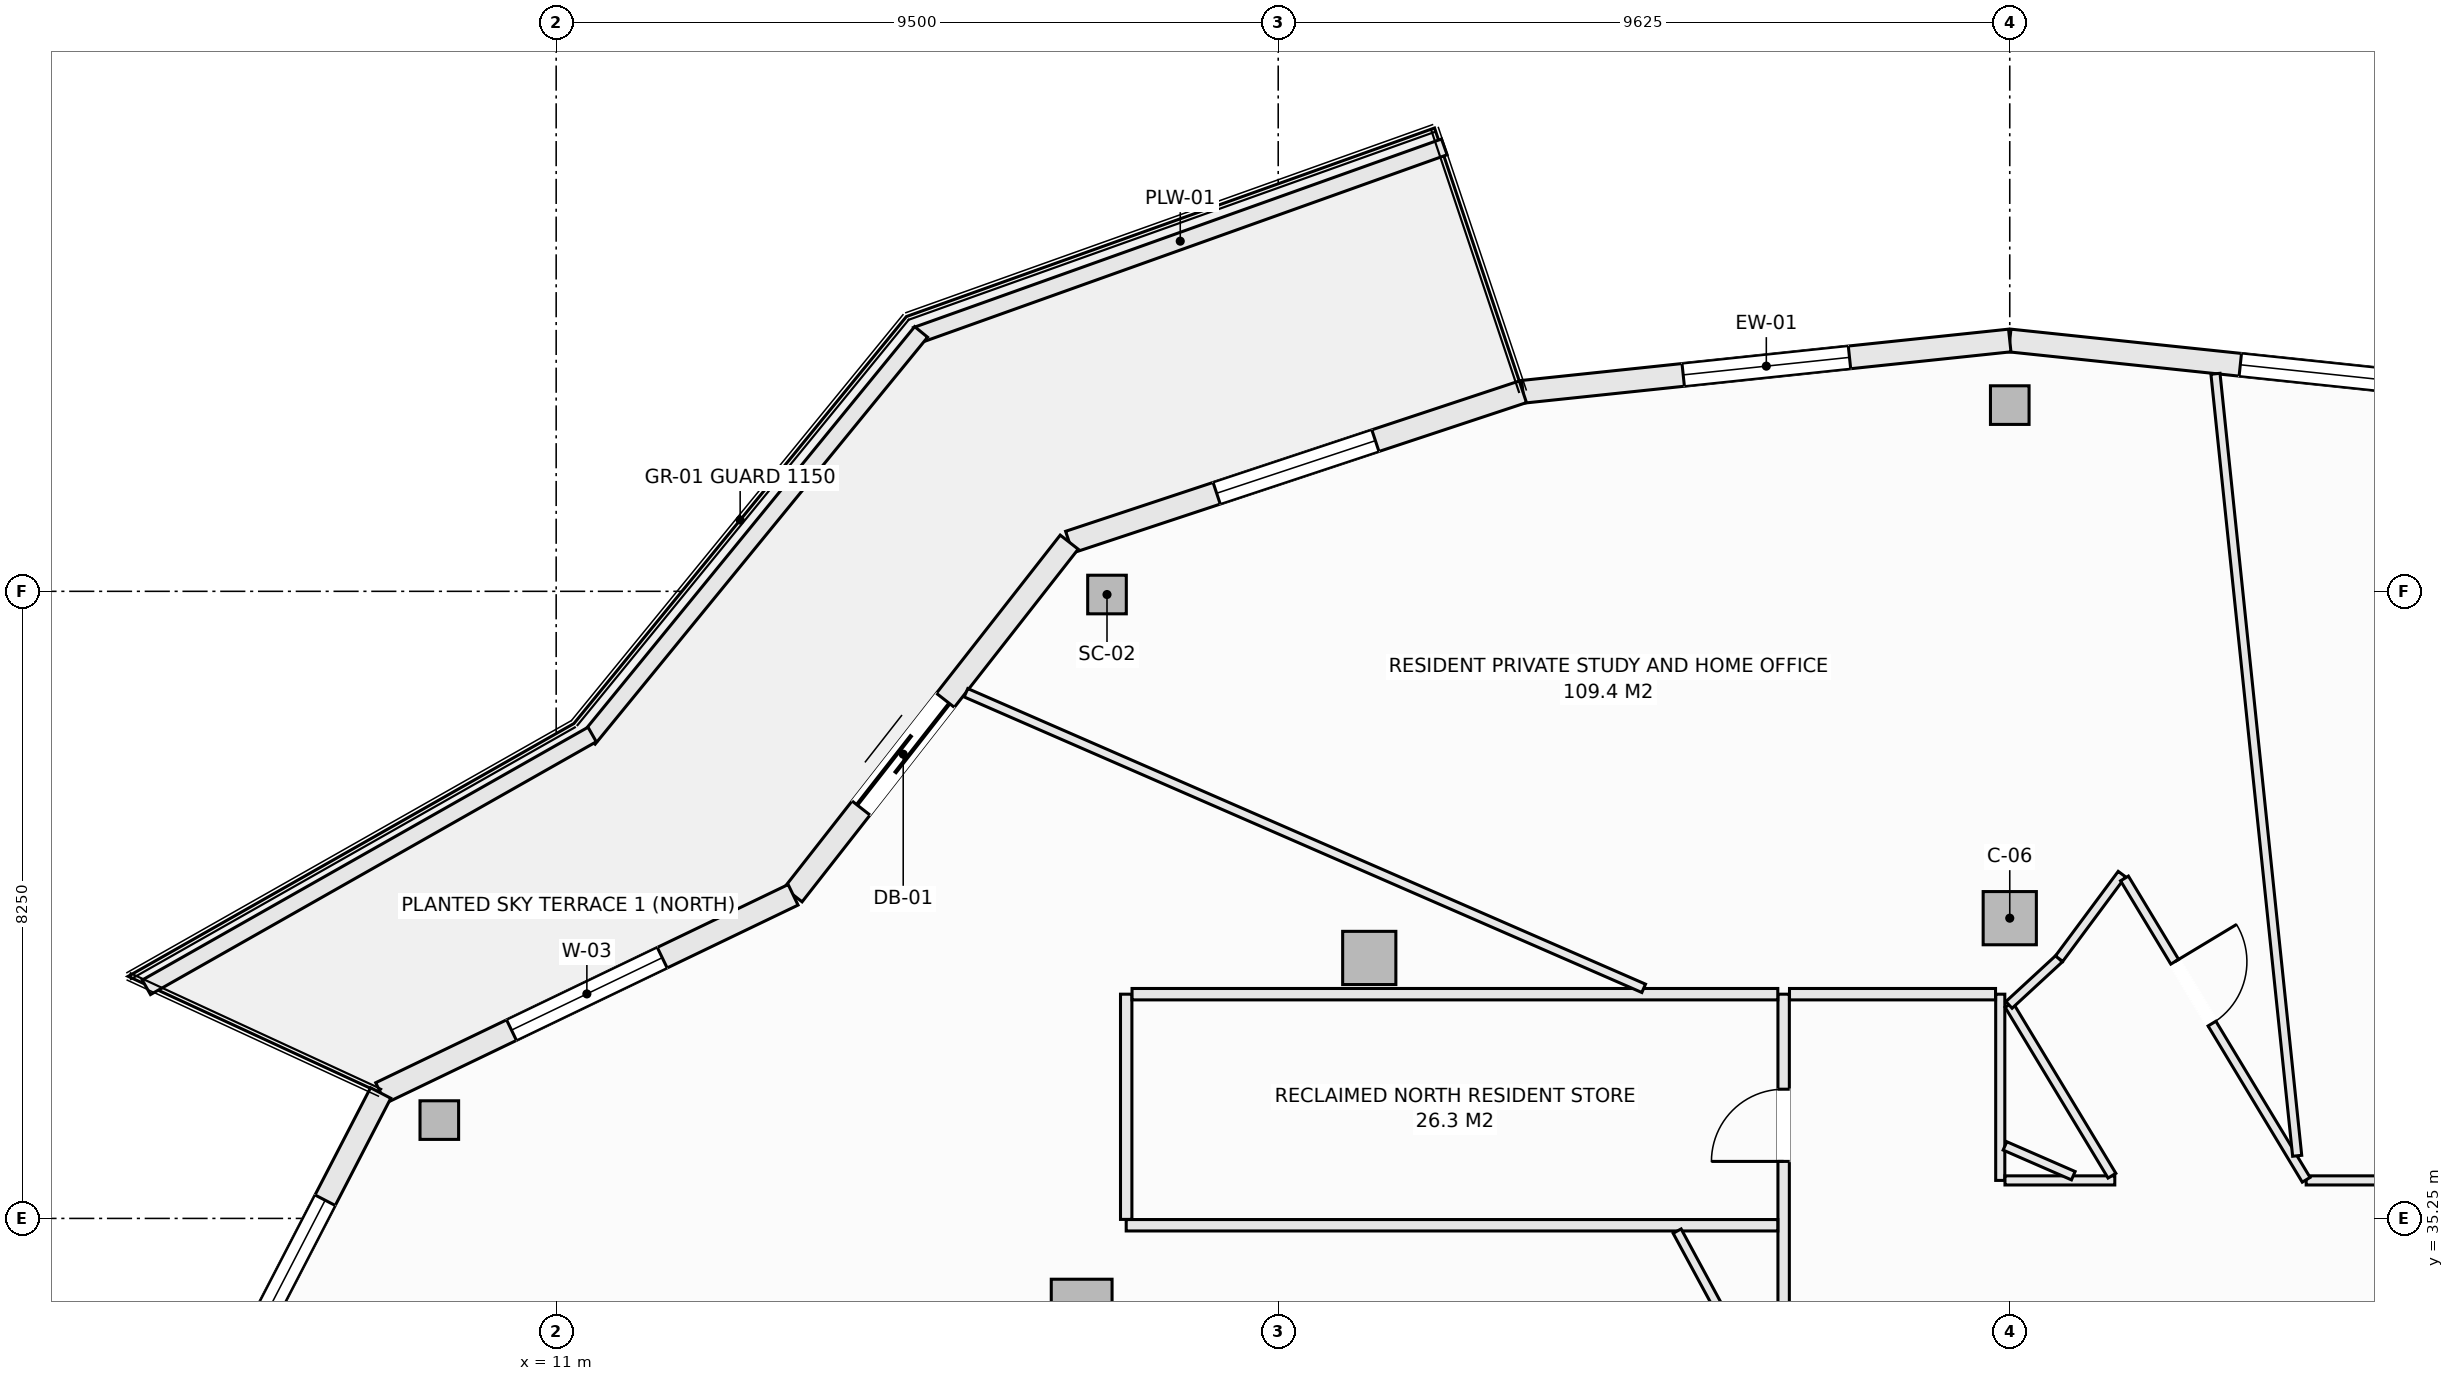
"""IFC4 building model, lengths in metres.
Left out: names, types, materials, properties, quantities, classifications, styles, units other than length and angle.
Written with IfcOpenShell. Run it as: python <this file> out.ifc"""

import sys

from ifc_helpers import new_model, si_unit, direction, frame, frame_2d, origin, origin_2d, place, context, subcontext, project, spatial, rectangle, hollow_rectangle, extrude, element, fill, save


model = new_model("IFC4")
c1 = context("Model", 3, precision=1e-05, world=origin(), true_north=direction((0.0, 1.0)))
c2 = subcontext(c1, "Body", "Model", "MODEL_VIEW")
j1 = project(units=[si_unit("LENGTHUNIT", "METRE"), si_unit("PLANEANGLEUNIT", "RADIAN")], contexts=[c1])
p1 = place(None, origin())
s1 = spatial("IfcSite", under=j1, at=p1, CompositionType="ELEMENT")
p2 = place(p1, origin())
s2 = spatial("IfcBuilding", under=s1, at=p2, CompositionType="ELEMENT")
p3 = place(p2, frame((0.0, 0.0, 229.4)))
s3 = spatial("IfcBuildingStorey", under=s2, at=p3, CompositionType="ELEMENT", Elevation=229.4)
for number, where, z_axis, x_axis in (
    (1, (30.125, 45.95, -0.27), (0.0, 0.0, 1.0), (1.0, 0.0, 0.0)),
    (2, (18.247, 43.458, -0.27), (0.0, 0.0, 1.0), (1.0, 0.0, 0.0)),
    (3, (9.463, 36.544, -0.27), (0.0, 0.0, 1.0), (1.0, 0.0, 0.0)),
):
    element("IfcColumn", number, at=place(p3, frame(where, z_axis=z_axis, x_axis=x_axis)), inside=s3, PredefinedType="COLUMN", context=c2, shape_type="SweptSolid", body=[
        extrude(hollow_rectangle(XDim=0.508, YDim=0.508, WallThickness=0.019, at=origin_2d()), origin(), (0.0, 0.0, 1.0), 3.3),
    ])
for number, where, z_axis, x_axis in (
    (4, (30.125, 39.2, -0.27), (0.0, 0.0, 1.0), (1.0, 0.0, 0.0)),
    (5, (21.698, 38.677, -0.27), (0.0, 0.0, 1.0), (1.0, 0.0, 0.0)),
):
    element("IfcColumn", number, at=place(p3, frame(where, z_axis=z_axis, x_axis=x_axis)), inside=s3, PredefinedType="COLUMN", context=c2, shape_type="SweptSolid", body=[
        extrude(rectangle(XDim=0.7, YDim=0.7, at=origin_2d()), origin(), (0.0, 0.0, 1.0), 3.3),
    ])
p4 = place(p3, frame((17.914, 34.05, -0.27), z_axis=(0.0, 0.0, 1.0), x_axis=(1.0, 0.0, 0.0)))
e6 = element("IfcColumn", 6, at=p4, inside=s3, PredefinedType="PILASTER", context=c2, shape_type="SweptSolid", body=[
    extrude(rectangle(XDim=0.8, YDim=0.8, at=origin_2d()), origin(), (0.0, 0.0, 1.0), 3.3),
])
p5 = place(p3, frame((30.125, 46.8, 0.0), z_axis=(0.0, 0.0, 1.0), x_axis=(0.994497142298, -0.104763705363, 0.0)))
e7 = element("IfcWall", 7, at=p5, inside=s3, PredefinedType="SOLIDWALL", context=c2, shape_type="SweptSolid", body=[
    extrude(rectangle(XDim=6.441, YDim=0.3, at=frame_2d((3.221, 0.0))), origin(), (0.0, 0.0, 1.0), 2.605),
])
p6 = place(p5, frame((3.05, 0.0, 0.72)))
e8 = element("IfcOpeningElement", 8, at=p6, cuts=e7, PredefinedType="OPENING", context=c2, shape_type="SweptSolid", body=[
    extrude(rectangle(XDim=2.2, YDim=1.65, at=frame_2d((1.1, 0.825))), frame((0.0, 0.16, 0.0), z_axis=(0.0, -1.0, 0.0), x_axis=(1.0, 0.0, 0.0)), (0.0, 0.0, 1.0), 0.32),
])
p7 = place(p3, frame((23.719, 46.125, 0.0), z_axis=(0.0, 0.0, 1.0), x_axis=(0.994497142298, 0.104763705363, 0.0)))
e9 = element("IfcWall", 9, at=p7, inside=s3, PredefinedType="SOLIDWALL", context=c2, shape_type="SweptSolid", body=[
    extrude(rectangle(XDim=6.441, YDim=0.3, at=frame_2d((3.221, 0.0))), origin(), (0.0, 0.0, 1.0), 2.605),
])
p8 = place(p7, frame((2.121, 0.0, 0.72)))
e10 = element("IfcOpeningElement", 10, at=p8, cuts=e9, PredefinedType="OPENING", context=c2, shape_type="SweptSolid", body=[
    extrude(rectangle(XDim=2.2, YDim=1.65, at=frame_2d((1.1, 0.825))), frame((0.0, 0.16, 0.0), z_axis=(0.0, -1.0, 0.0), x_axis=(1.0, 0.0, 0.0)), (0.0, 0.0, 1.0), 0.32),
])
p9 = place(p3, frame((17.75, 44.147, 0.0), z_axis=(0.0, 0.0, 1.0), x_axis=(0.949240877604, 0.314550085495, 0.0)))
e11 = element("IfcWall", 11, at=p9, inside=s3, PredefinedType="SOLIDWALL", context=c2, shape_type="SweptSolid", body=[
    extrude(rectangle(XDim=6.288, YDim=0.3, at=frame_2d((3.144, 0.0))), origin(), (0.0, 0.0, 1.0), 2.605),
])
p10 = place(p9, frame((2.044, 0.0, 0.72)))
e12 = element("IfcOpeningElement", 12, at=p10, cuts=e11, PredefinedType="OPENING", context=c2, shape_type="SweptSolid", body=[
    extrude(rectangle(XDim=2.2, YDim=1.65, at=frame_2d((1.1, 0.825))), frame((0.0, 0.16, 0.0), z_axis=(0.0, -1.0, 0.0), x_axis=(1.0, 0.0, 0.0)), (0.0, 0.0, 1.0), 0.32),
])
p11 = place(p3, frame((14.117, 39.507, 0.0), z_axis=(0.0, 0.0, 1.0), x_axis=(0.616450126935, 0.787393955401, 0.0)))
e13 = element("IfcWall", 13, at=p11, inside=s3, PredefinedType="SOLIDWALL", context=c2, shape_type="SweptSolid", body=[
    extrude(rectangle(XDim=5.893, YDim=0.3, at=frame_2d((2.946, 0.0))), origin(), (0.0, 0.0, 1.0), 2.605),
])
p12 = place(p11, frame((1.45, 0.0, 0.0)))
e14 = element("IfcOpeningElement", 14, at=p12, cuts=e13, PredefinedType="OPENING", context=c2, shape_type="SweptSolid", body=[
    extrude(rectangle(XDim=1.8, YDim=2.25, at=frame_2d((0.9, 1.125))), frame((0.0, 0.16, 0.0), z_axis=(0.0, -1.0, 0.0), x_axis=(1.0, 0.0, 0.0)), (0.0, 0.0, 1.0), 0.32),
])
p13 = place(p3, frame((8.691, 36.9, 0.0), z_axis=(0.0, 0.0, 1.0), x_axis=(0.901348331142, 0.433094892545, 0.0)))
e15 = element("IfcWall", 15, at=p13, inside=s3, PredefinedType="SOLIDWALL", context=c2, shape_type="SweptSolid", body=[
    extrude(rectangle(XDim=6.021, YDim=0.3, at=frame_2d((3.01, 0.0))), origin(), (0.0, 0.0, 1.0), 2.605),
])
p14 = place(p13, frame((1.91, 0.0, 0.72)))
e16 = element("IfcOpeningElement", 16, at=p14, cuts=e15, PredefinedType="OPENING", context=c2, shape_type="SweptSolid", body=[
    extrude(rectangle(XDim=2.2, YDim=1.65, at=frame_2d((1.1, 0.825))), frame((0.0, 0.16, 0.0), z_axis=(0.0, -1.0, 0.0), x_axis=(1.0, 0.0, 0.0)), (0.0, 0.0, 1.0), 0.32),
])
p15 = place(p3, frame((6.218, 32.125, 0.0), z_axis=(0.0, 0.0, 1.0), x_axis=(0.459808219482, 0.888018243786, 0.0)))
e17 = element("IfcWall", 17, at=p15, inside=s3, PredefinedType="SOLIDWALL", context=c2, shape_type="SweptSolid", body=[
    extrude(rectangle(XDim=5.378, YDim=0.3, at=frame_2d((2.689, 0.0))), origin(), (0.0, 0.0, 1.0), 2.605),
])
p16 = place(p15, frame((1.589, 0.0, 0.72)))
e18 = element("IfcOpeningElement", 18, at=p16, cuts=e17, PredefinedType="OPENING", context=c2, shape_type="SweptSolid", body=[
    extrude(rectangle(XDim=2.2, YDim=1.65, at=frame_2d((1.1, 0.825))), frame((0.0, 0.16, 0.0), z_axis=(0.0, -1.0, 0.0), x_axis=(1.0, 0.0, 0.0)), (0.0, 0.0, 1.0), 0.32),
])
p17 = place(p3, frame((15.737, 46.866, 0.0), z_axis=(0.0, 0.0, 1.0), x_axis=(0.941780086523, 0.336229488042, 0.0)))
e19 = element("IfcWall", 19, at=p17, inside=s3, PredefinedType="PARAPET", context=c2, shape_type="SweptSolid", body=[
    extrude(rectangle(XDim=7.378, YDim=0.22, at=frame_2d((3.689, 0.0))), origin(), (0.0, 0.0, 1.0), 0.52),
])
p18 = place(p3, frame((11.427, 41.559, 0.0), z_axis=(0.0, 0.0, 1.0), x_axis=(0.632697312147, 0.774399193699, 0.0)))
e20 = element("IfcWall", 20, at=p18, inside=s3, PredefinedType="PARAPET", context=c2, shape_type="SweptSolid", body=[
    extrude(rectangle(XDim=6.914, YDim=0.22, at=frame_2d((3.457, 0.0))), origin(), (0.0, 0.0, 1.0), 0.52),
])
p19 = place(p3, frame((5.608, 38.291, 0.0), z_axis=(0.0, 0.0, 1.0), x_axis=(0.869860619267, 0.493297580623, 0.0)))
e21 = element("IfcWall", 21, at=p19, inside=s3, PredefinedType="PARAPET", context=c2, shape_type="SweptSolid", body=[
    extrude(rectangle(XDim=6.743, YDim=0.22, at=frame_2d((3.371, 0.0))), origin(), (0.0, 0.0, 1.0), 0.52),
])
p20 = place(p3, frame((27.15, 34.002, 0.0), z_axis=(0.0, 0.0, 1.0), x_axis=(0.0, 1.0, 0.0)))
e22 = element("IfcWall", 22, at=p20, inside=s3, PredefinedType="PARTITIONING", context=c2, shape_type="SweptSolid", body=[
    extrude(rectangle(XDim=4.198, YDim=0.15, at=frame_2d((2.099, 0.0))), origin(), (0.0, 0.0, 1.0), 3.03),
])
p21 = place(p20, frame((1.998, 0.0, 0.0)))
e23 = element("IfcOpeningElement", 23, at=p21, cuts=e22, PredefinedType="OPENING", context=c2, shape_type="SweptSolid", body=[
    extrude(rectangle(XDim=0.95, YDim=2.1, at=frame_2d((0.475, 1.05))), frame((0.0, 0.085, 0.0), z_axis=(0.0, -1.0, 0.0), x_axis=(1.0, 0.0, 0.0)), (0.0, 0.0, 1.0), 0.17),
])
p22 = place(p3, frame((30.0, 35.75, 0.0), z_axis=(0.0, 0.0, 1.0), x_axis=(0.0, 1.0, 0.0)))
e24 = element("IfcWall", 24, at=p22, inside=s3, PredefinedType="PARTITIONING", context=c2, shape_type="SweptSolid", body=[
    extrude(rectangle(XDim=2.45, YDim=0.12, at=frame_2d((1.225, 0.0))), origin(), (0.0, 0.0, 1.0), 3.03),
])
p23 = place(p3, frame((18.5, 35.16, 0.0), z_axis=(0.0, 0.0, 1.0), x_axis=(1.0, 0.0, 0.0)))
e25 = element("IfcWall", 25, at=p23, inside=s3, PredefinedType="PARTITIONING", context=c2, shape_type="SweptSolid", body=[
    extrude(rectangle(XDim=8.573, YDim=0.15, at=frame_2d((4.287, 0.0))), origin(), (0.0, 0.0, 1.0), 3.03),
])
p24 = place(p3, frame((18.5, 35.237, 0.0), z_axis=(0.0, 0.0, 1.0), x_axis=(0.0, 1.0, 0.0)))
e26 = element("IfcWall", 26, at=p24, inside=s3, PredefinedType="PARTITIONING", context=c2, shape_type="SweptSolid", body=[
    extrude(rectangle(XDim=2.963, YDim=0.15, at=frame_2d((1.481, 0.0))), origin(), (0.0, 0.0, 1.0), 3.03),
])
p25 = place(p3, frame((18.577, 38.2, 0.0), z_axis=(0.0, 0.0, 1.0), x_axis=(1.0, 0.0, 0.0)))
e27 = element("IfcWall", 27, at=p25, inside=s3, PredefinedType="PARTITIONING", context=c2, shape_type="SweptSolid", body=[
    extrude(rectangle(XDim=8.496, YDim=0.15, at=frame_2d((4.248, 0.0))), origin(), (0.0, 0.0, 1.0), 3.03),
])
p26 = place(p3, frame((27.227, 38.2, 0.0), z_axis=(0.0, 0.0, 1.0), x_axis=(1.0, 0.0, 0.0)))
e28 = element("IfcWall", 28, at=p26, inside=s3, PredefinedType="PARTITIONING", context=c2, shape_type="SweptSolid", body=[
    extrude(rectangle(XDim=2.711, YDim=0.15, at=frame_2d((1.355, 0.0))), origin(), (0.0, 0.0, 1.0), 3.03),
])
p27 = place(p3, frame((30.062, 35.75, 0.0), z_axis=(0.0, 0.0, 1.0), x_axis=(1.0, 0.0, 0.0)))
e29 = element("IfcWall", 29, at=p27, inside=s3, PredefinedType="PARTITIONING", context=c2, shape_type="SweptSolid", body=[
    extrude(rectangle(XDim=1.445, YDim=0.12, at=frame_2d((0.723, 0.0))), origin(), (0.0, 0.0, 1.0), 3.03),
])
p28 = place(p3, frame((34.025, 35.75, 0.0), z_axis=(0.0, 0.0, 1.0), x_axis=(1.0, 0.0, 0.0)))
e30 = element("IfcWall", 30, at=p28, inside=s3, PredefinedType="PARTITIONING", context=c2, shape_type="SweptSolid", body=[
    extrude(rectangle(XDim=5.025, YDim=0.12, at=frame_2d((2.513, 0.0))), origin(), (0.0, 0.0, 1.0), 2.478),
])
p29 = place(p28, frame((1.617, 0.0, 0.0)))
e31 = element("IfcOpeningElement", 31, at=p29, cuts=e30, PredefinedType="OPENING", context=c2, shape_type="SweptSolid", body=[
    extrude(rectangle(XDim=0.95, YDim=2.1, at=frame_2d((0.475, 1.05))), frame((0.0, 0.07, 0.0), z_axis=(0.0, -1.0, 0.0), x_axis=(1.0, 0.0, 0.0)), (0.0, 0.0, 1.0), 0.14),
])
p30 = place(p3, frame((30.115, 38.059, 0.0), z_axis=(0.0, 0.0, 1.0), x_axis=(0.516246227887, -0.85644020935, 0.0)))
e32 = element("IfcWall", 32, at=p30, inside=s3, PredefinedType="PARTITIONING", context=c2, shape_type="SweptSolid", body=[
    extrude(rectangle(XDim=2.624, YDim=0.12, at=frame_2d((1.312, 0.0))), origin(), (0.0, 0.0, 1.0), 3.03),
])
p31 = place(p3, frame((30.115, 38.059, 0.0), z_axis=(0.0, 0.0, 1.0), x_axis=(0.734991343239, 0.678076489316, 0.0)))
e33 = element("IfcWall", 33, at=p31, inside=s3, PredefinedType="PARTITIONING", context=c2, shape_type="SweptSolid", body=[
    extrude(rectangle(XDim=0.896, YDim=0.12, at=frame_2d((0.448, 0.0))), origin(), (0.0, 0.0, 1.0), 3.03),
])
p32 = place(p3, frame((30.774, 38.667, 0.0), z_axis=(0.0, 0.0, 1.0), x_axis=(0.596019138224, 0.802970227885, 0.0)))
e34 = element("IfcWall", 34, at=p32, inside=s3, PredefinedType="PARTITIONING", context=c2, shape_type="SweptSolid", body=[
    extrude(rectangle(XDim=1.386, YDim=0.12, at=frame_2d((0.693, 0.0))), origin(), (0.0, 0.0, 1.0), 3.03),
])
p33 = place(p3, frame((31.635, 39.723, 0.0), z_axis=(0.0, 0.0, 1.0), x_axis=(0.516340331217, -0.856383478565, 0.0)))
e35 = element("IfcWall", 35, at=p33, inside=s3, PredefinedType="PARTITIONING", context=c2, shape_type="SweptSolid", body=[
    extrude(rectangle(XDim=4.629, YDim=0.12, at=frame_2d((2.315, 0.0))), origin(), (0.0, 0.0, 1.0), 3.03),
])
p34 = place(p33, frame((1.28, 0.0, 0.0)))
e36 = element("IfcOpeningElement", 36, at=p34, cuts=e35, PredefinedType="OPENING", context=c2, shape_type="SweptSolid", body=[
    extrude(rectangle(XDim=0.95, YDim=2.1, at=frame_2d((0.475, 1.05))), frame((0.0, 0.07, 0.0), z_axis=(0.0, -1.0, 0.0), x_axis=(1.0, 0.0, 0.0)), (0.0, 0.0, 1.0), 0.14),
])
p35 = place(p3, frame((16.392, 42.166, 0.0), z_axis=(0.0, 0.0, 1.0), x_axis=(0.916624998673, -0.399748185496, 0.0)))
e37 = element("IfcWall", 37, at=p35, inside=s3, PredefinedType="PARTITIONING", context=c2, shape_type="SweptSolid", body=[
    extrude(rectangle(XDim=9.728, YDim=0.12, at=frame_2d((4.864, 0.0))), origin(), (0.0, 0.0, 1.0), 2.478),
])
p36 = place(p3, frame((30.062, 36.204, 0.0), z_axis=(0.0, 0.0, 1.0), x_axis=(0.916602414635, -0.39979996684, 0.0)))
e38 = element("IfcWall", 38, at=p36, inside=s3, PredefinedType="PARTITIONING", context=c2, shape_type="SweptSolid", body=[
    extrude(rectangle(XDim=0.981, YDim=0.12, at=frame_2d((0.49, 0.0))), origin(), (0.0, 0.0, 1.0), 3.03),
])
p37 = place(p3, frame((32.832, 46.362, 0.0), z_axis=(0.0, 0.0, 1.0), x_axis=(0.103942686354, -0.994583288595, 0.0)))
e39 = element("IfcWall", 39, at=p37, inside=s3, PredefinedType="PARTITIONING", context=c2, shape_type="SweptSolid", body=[
    extrude(rectangle(XDim=10.344, YDim=0.12, at=frame_2d((5.172, 0.0))), origin(), (0.0, 0.0, 1.0), 2.77),
])
p38 = place(p3, frame((25.749, 35.083, 0.0), z_axis=(0.0, 0.0, 1.0), x_axis=(0.476052805352, -0.879416696746, 0.0)))
e40 = element("IfcWall", 40, at=p38, inside=s3, PredefinedType="PARTITIONING", context=c2, shape_type="SweptSolid", body=[
    extrude(rectangle(XDim=1.229, YDim=0.12, at=frame_2d((0.615, 0.0))), origin(), (0.0, 0.0, 1.0), 3.03),
])
p39 = place(p6, origin())
e41 = element("IfcWindow", 41, at=p39, inside=s3, PartitioningType="SINGLE_PANEL", PredefinedType="WINDOW", context=c2, shape_type="SweptSolid", body=[
    extrude(rectangle(XDim=2.2, YDim=1.65, at=frame_2d((1.1, 0.825))), frame((0.0, 0.03, 0.0), z_axis=(0.0, -1.0, 0.0), x_axis=(1.0, 0.0, 0.0)), (0.0, 0.0, 1.0), 0.06),
])
fill(e8, e41)
p40 = place(p8, origin())
e42 = element("IfcWindow", 42, at=p40, inside=s3, PartitioningType="SINGLE_PANEL", PredefinedType="WINDOW", context=c2, shape_type="SweptSolid", body=[
    extrude(rectangle(XDim=2.2, YDim=1.65, at=frame_2d((1.1, 0.825))), frame((0.0, 0.03, 0.0), z_axis=(0.0, -1.0, 0.0), x_axis=(1.0, 0.0, 0.0)), (0.0, 0.0, 1.0), 0.06),
])
fill(e10, e42)
p41 = place(p10, origin())
e43 = element("IfcWindow", 43, at=p41, inside=s3, PartitioningType="SINGLE_PANEL", PredefinedType="WINDOW", context=c2, shape_type="SweptSolid", body=[
    extrude(rectangle(XDim=2.2, YDim=1.65, at=frame_2d((1.1, 0.825))), frame((0.0, 0.03, 0.0), z_axis=(0.0, -1.0, 0.0), x_axis=(1.0, 0.0, 0.0)), (0.0, 0.0, 1.0), 0.06),
])
fill(e12, e43)
p42 = place(p12, origin())
e44 = element("IfcDoor", 44, at=p42, inside=s3, OperationType="SLIDING_TO_LEFT", PredefinedType="DOOR", context=c2, shape_type="SweptSolid", body=[
    extrude(rectangle(XDim=1.8, YDim=2.25, at=frame_2d((0.9, 1.125))), frame((0.0, 0.025, 0.0), z_axis=(0.0, -1.0, 0.0), x_axis=(1.0, 0.0, 0.0)), (0.0, 0.0, 1.0), 0.05),
])
fill(e14, e44)
p43 = place(p14, origin())
e45 = element("IfcWindow", 45, at=p43, inside=s3, PartitioningType="SINGLE_PANEL", PredefinedType="WINDOW", context=c2, shape_type="SweptSolid", body=[
    extrude(rectangle(XDim=2.2, YDim=1.65, at=frame_2d((1.1, 0.825))), frame((0.0, 0.03, 0.0), z_axis=(0.0, -1.0, 0.0), x_axis=(1.0, 0.0, 0.0)), (0.0, 0.0, 1.0), 0.06),
])
fill(e16, e45)
p44 = place(p16, origin())
e46 = element("IfcWindow", 46, at=p44, inside=s3, PartitioningType="SINGLE_PANEL", PredefinedType="WINDOW", context=c2, shape_type="SweptSolid", body=[
    extrude(rectangle(XDim=2.2, YDim=1.65, at=frame_2d((1.1, 0.825))), frame((0.0, 0.03, 0.0), z_axis=(0.0, -1.0, 0.0), x_axis=(1.0, 0.0, 0.0)), (0.0, 0.0, 1.0), 0.06),
])
fill(e18, e46)
p45 = place(p21, origin())
e47 = element("IfcDoor", 47, at=p45, inside=s3, OperationType="SINGLE_SWING_LEFT", PredefinedType="DOOR", context=c2, shape_type="SweptSolid", body=[
    extrude(rectangle(XDim=0.95, YDim=2.1, at=frame_2d((0.475, 1.05))), frame((0.0, 0.025, 0.0), z_axis=(0.0, -1.0, 0.0), x_axis=(1.0, 0.0, 0.0)), (0.0, 0.0, 1.0), 0.05),
])
fill(e23, e47)
p46 = place(p34, origin())
e48 = element("IfcDoor", 48, at=p46, inside=s3, OperationType="SINGLE_SWING_LEFT", PredefinedType="DOOR", context=c2, shape_type="SweptSolid", body=[
    extrude(rectangle(XDim=0.95, YDim=2.1, at=frame_2d((0.475, 1.05))), frame((0.0, 0.025, 0.0), z_axis=(0.0, -1.0, 0.0), x_axis=(1.0, 0.0, 0.0)), (0.0, 0.0, 1.0), 0.05),
])
fill(e36, e48)
save(model, sys.argv[1])
